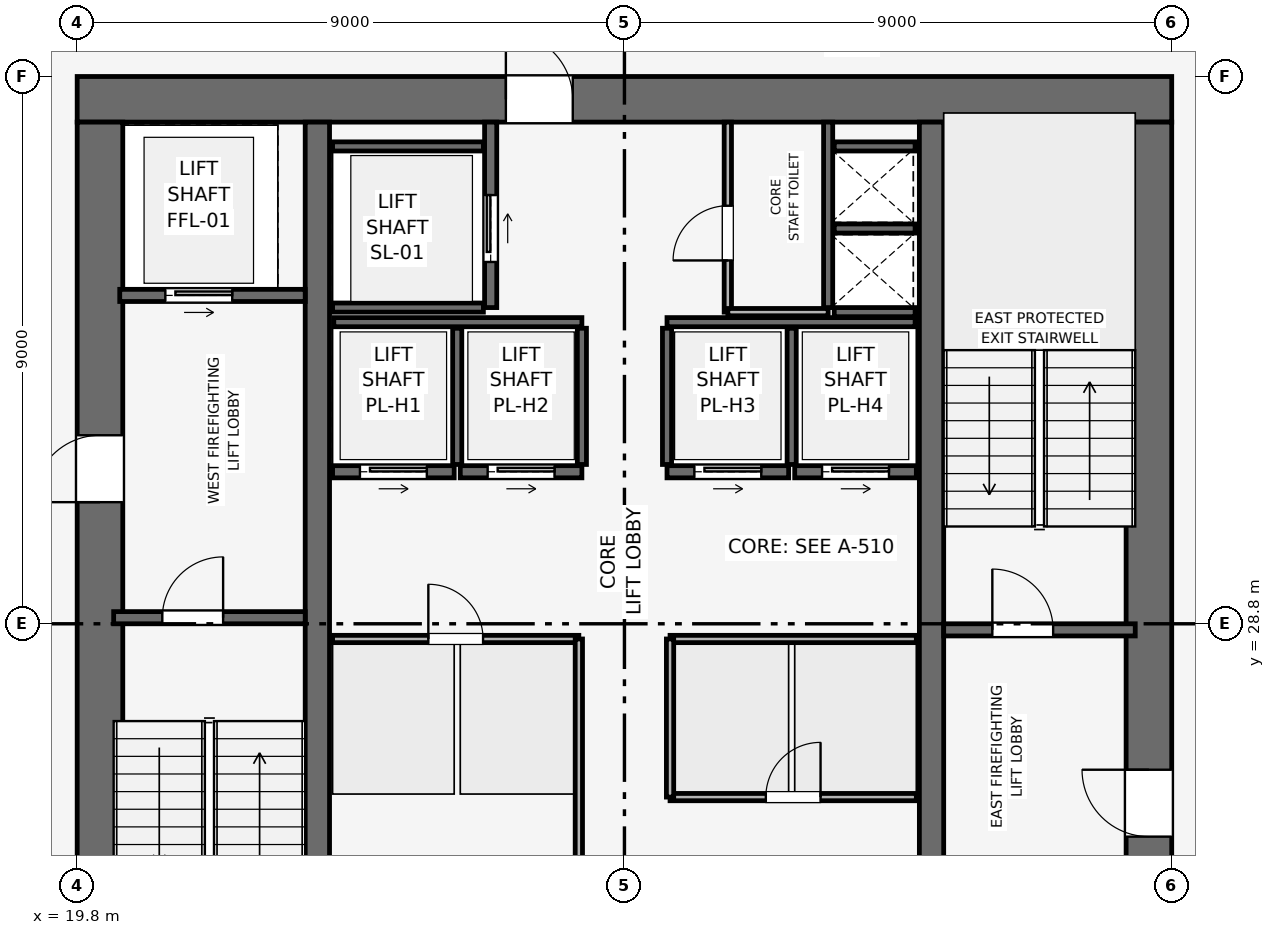
"""IFC4 building model, lengths in metres.
Left out: names, types, materials, properties, quantities, classifications, styles, units other than length and angle.
Written with IfcOpenShell. Run it as: python <this file> out.ifc"""

import sys

from ifc_helpers import new_model, si_unit, direction, frame, frame_2d, origin, place, context, subcontext, project, spatial, rectangle, extrude, element, fill, save


model = new_model("IFC4")
c1 = context("Model", 3, precision=1e-05, world=origin(), true_north=direction((0.0, 1.0)))
c2 = subcontext(c1, "Body", "Model", "MODEL_VIEW")
j1 = project(units=[si_unit("LENGTHUNIT", "METRE"), si_unit("PLANEANGLEUNIT", "RADIAN")], contexts=[c1])
p1 = place(None, origin())
s1 = spatial("IfcSite", under=j1, at=p1, CompositionType="ELEMENT")
p2 = place(p1, origin())
s2 = spatial("IfcBuilding", under=s1, at=p2, CompositionType="ELEMENT")
p3 = place(p2, frame((0.0, 0.0, 265.35)))
s3 = spatial("IfcBuildingStorey", under=s2, at=p3, CompositionType="ELEMENT", Elevation=265.35)
p4 = place(p3, frame((19.8, 37.425, 0.0), z_axis=(0.0, 0.0, 1.0), x_axis=(1.0, 0.0, 0.0)))
e1 = element("IfcWall", 1, at=p4, inside=s3, PredefinedType="SHEAR", context=c2, shape_type="SweptSolid", body=[
    extrude(rectangle(XDim=18.0, YDim=0.75, at=frame_2d((9.0, 0.0))), origin(), (0.0, 0.0, 1.0), 3.75),
])
p5 = place(p4, frame((7.05, 0.0, 0.0)))
e2 = element("IfcOpeningElement", 2, at=p5, cuts=e1, PredefinedType="OPENING", context=c2, shape_type="SweptSolid", body=[
    extrude(rectangle(XDim=1.1, YDim=2.15, at=frame_2d((0.55, 1.075))), frame((0.0, 0.385, 0.0), z_axis=(0.0, -1.0, 0.0), x_axis=(1.0, 0.0, 0.0)), (0.0, 0.0, 1.0), 0.77),
])
p6 = place(p3, frame((20.175, 20.55, 0.0), z_axis=(0.0, 0.0, 1.0), x_axis=(0.0, 1.0, 0.0)))
e3 = element("IfcWall", 3, at=p6, inside=s3, PredefinedType="SHEAR", context=c2, shape_type="SweptSolid", body=[
    extrude(rectangle(XDim=16.5, YDim=0.75, at=frame_2d((8.25, 0.0))), origin(), (0.0, 0.0, 1.0), 3.75),
])
p7 = place(p6, frame((10.25, 0.0, 0.0)))
e4 = element("IfcOpeningElement", 4, at=p7, cuts=e3, PredefinedType="OPENING", context=c2, shape_type="SweptSolid", body=[
    extrude(rectangle(XDim=1.1, YDim=2.15, at=frame_2d((0.55, 1.075))), frame((0.0, 0.385, 0.0), z_axis=(0.0, -1.0, 0.0), x_axis=(1.0, 0.0, 0.0)), (0.0, 0.0, 1.0), 0.77),
])
p8 = place(p3, frame((37.425, 20.55, 0.0), z_axis=(0.0, 0.0, 1.0), x_axis=(0.0, 1.0, 0.0)))
e5 = element("IfcWall", 5, at=p8, inside=s3, PredefinedType="SHEAR", context=c2, shape_type="SweptSolid", body=[
    extrude(rectangle(XDim=16.5, YDim=0.75, at=frame_2d((8.25, 0.0))), origin(), (0.0, 0.0, 1.0), 3.75),
])
p9 = place(p8, frame((4.75, 0.0, 0.0)))
e6 = element("IfcOpeningElement", 6, at=p9, cuts=e5, PredefinedType="OPENING", context=c2, shape_type="SweptSolid", body=[
    extrude(rectangle(XDim=1.1, YDim=2.15, at=frame_2d((0.55, 1.075))), frame((0.0, 0.385, 0.0), z_axis=(0.0, -1.0, 0.0), x_axis=(1.0, 0.0, 0.0)), (0.0, 0.0, 1.0), 0.77),
])
for number, where, z_axis, x_axis in (
    (7, (23.75, 20.55, 0.0), (0.0, 0.0, 1.0), (0.0, 1.0, 0.0)),
    (8, (33.85, 20.55, 0.0), (0.0, 0.0, 1.0), (0.0, 1.0, 0.0)),
):
    element("IfcWall", number, at=place(p3, frame(where, z_axis=z_axis, x_axis=x_axis)), inside=s3, PredefinedType="SHEAR", context=c2, shape_type="SweptSolid", body=[
        extrude(rectangle(XDim=16.5, YDim=0.4, at=frame_2d((8.25, 0.0))), origin(), (0.0, 0.0, 1.0), 3.75),
    ])
p10 = place(p3, frame((20.4, 28.9, 0.0), z_axis=(0.0, 0.0, 1.0), x_axis=(1.0, 0.0, 0.0)))
e9 = element("IfcWall", 9, at=p10, inside=s3, PredefinedType="SHEAR", context=c2, shape_type="SweptSolid", body=[
    extrude(rectangle(XDim=3.15, YDim=0.2, at=frame_2d((1.575, 0.0))), origin(), (0.0, 0.0, 1.0), 3.5),
])
p11 = place(p10, frame((0.8, 0.0, 0.0)))
e10 = element("IfcOpeningElement", 10, at=p11, cuts=e9, PredefinedType="OPENING", context=c2, shape_type="SweptSolid", body=[
    extrude(rectangle(XDim=1.0, YDim=2.1, at=frame_2d((0.5, 1.05))), frame((0.0, 0.11, 0.0), z_axis=(0.0, -1.0, 0.0), x_axis=(1.0, 0.0, 0.0)), (0.0, 0.0, 1.0), 0.22),
])
p12 = place(p3, frame((34.05, 28.7, 0.0), z_axis=(0.0, 0.0, 1.0), x_axis=(1.0, 0.0, 0.0)))
e11 = element("IfcWall", 11, at=p12, inside=s3, PredefinedType="SHEAR", context=c2, shape_type="SweptSolid", body=[
    extrude(rectangle(XDim=3.15, YDim=0.2, at=frame_2d((1.575, 0.0))), origin(), (0.0, 0.0, 1.0), 3.5),
])
p13 = place(p12, frame((0.8, 0.0, 0.0)))
e12 = element("IfcOpeningElement", 12, at=p13, cuts=e11, PredefinedType="OPENING", context=c2, shape_type="SweptSolid", body=[
    extrude(rectangle(XDim=1.0, YDim=2.1, at=frame_2d((0.5, 1.05))), frame((0.0, 0.11, 0.0), z_axis=(0.0, -1.0, 0.0), x_axis=(1.0, 0.0, 0.0)), (0.0, 0.0, 1.0), 0.22),
])
p14 = place(p3, frame((32.15, 34.0, 0.0), z_axis=(0.0, 0.0, 1.0), x_axis=(0.0, 1.0, 0.0)))
e13 = element("IfcWall", 13, at=p14, inside=s3, PredefinedType="SHEAR", context=c2, shape_type="SweptSolid", body=[
    extrude(rectangle(XDim=3.05, YDim=0.15, at=frame_2d((1.525, 0.0))), origin(), (0.0, 0.0, 1.0), 3.5),
])
for number, where, z_axis, x_axis in (
    (14, (32.25, 33.925, 0.0), (0.0, 0.0, 1.0), (1.0, 0.0, 0.0)),
    (15, (32.25, 35.3, 0.0), (0.0, 0.0, 1.0), (1.0, 0.0, 0.0)),
):
    element("IfcWall", number, at=place(p3, frame(where, z_axis=z_axis, x_axis=x_axis)), inside=s3, PredefinedType="SHEAR", context=c2, shape_type="SweptSolid", body=[
        extrude(rectangle(XDim=1.33, YDim=0.15, at=frame_2d((0.665, 0.0))), origin(), (0.0, 0.0, 1.0), 3.5),
    ])
p15 = place(p3, frame((20.5, 34.2, 0.0), z_axis=(0.0, 0.0, 1.0), x_axis=(1.0, 0.0, 0.0)))
e16 = element("IfcWall", 16, at=p15, inside=s3, PredefinedType="SHEAR", context=c2, shape_type="SweptSolid", body=[
    extrude(rectangle(XDim=3.05, YDim=0.2, at=frame_2d((1.525, 0.0))), origin(), (0.0, 0.0, 1.0), 3.5),
])
p16 = place(p15, frame((0.75, 0.0, 0.0)))
e17 = element("IfcOpeningElement", 17, at=p16, cuts=e16, PredefinedType="OPENING", context=c2, shape_type="SweptSolid", body=[
    extrude(rectangle(XDim=1.1, YDim=2.15, at=frame_2d((0.55, 1.075))), frame((0.0, 0.11, 0.0), z_axis=(0.0, -1.0, 0.0), x_axis=(1.0, 0.0, 0.0)), (0.0, 0.0, 1.0), 0.22),
])
p17 = place(p3, frame((26.6, 34.0, 0.0), z_axis=(0.0, 0.0, 1.0), x_axis=(0.0, 1.0, 0.0)))
e18 = element("IfcWall", 18, at=p17, inside=s3, PredefinedType="SHEAR", context=c2, shape_type="SweptSolid", body=[
    extrude(rectangle(XDim=3.05, YDim=0.2, at=frame_2d((1.525, 0.0))), origin(), (0.0, 0.0, 1.0), 3.5),
])
p18 = place(p17, frame((0.75, 0.0, 0.0)))
e19 = element("IfcOpeningElement", 19, at=p18, cuts=e18, PredefinedType="OPENING", context=c2, shape_type="SweptSolid", body=[
    extrude(rectangle(XDim=1.1, YDim=2.15, at=frame_2d((0.55, 1.075))), frame((0.0, 0.11, 0.0), z_axis=(0.0, -1.0, 0.0), x_axis=(1.0, 0.0, 0.0)), (0.0, 0.0, 1.0), 0.22),
])
for number, where, z_axis, x_axis in (
    (20, (24.0, 34.0, 0.0), (0.0, 0.0, 1.0), (1.0, 0.0, 0.0)),
    (21, (24.0, 36.65, 0.0), (0.0, 0.0, 1.0), (1.0, 0.0, 0.0)),
):
    element("IfcWall", number, at=place(p3, frame(where, z_axis=z_axis, x_axis=x_axis)), inside=s3, PredefinedType="SHEAR", context=c2, shape_type="SweptSolid", body=[
        extrude(rectangle(XDim=2.48, YDim=0.15, at=frame_2d((1.24, 0.0))), origin(), (0.0, 0.0, 1.0), 3.5),
    ])
p19 = place(p3, frame((24.0, 31.3, 0.0), z_axis=(0.0, 0.0, 1.0), x_axis=(1.0, 0.0, 0.0)))
e22 = element("IfcWall", 22, at=p19, inside=s3, PredefinedType="SHEAR", context=c2, shape_type="SweptSolid", body=[
    extrude(rectangle(XDim=2.0, YDim=0.2, at=frame_2d((1.0, 0.0))), origin(), (0.0, 0.0, 1.0), 3.5),
])
p20 = place(p19, frame((0.45, 0.0, 0.0)))
e23 = element("IfcOpeningElement", 23, at=p20, cuts=e22, PredefinedType="OPENING", context=c2, shape_type="SweptSolid", body=[
    extrude(rectangle(XDim=1.1, YDim=2.15, at=frame_2d((0.55, 1.075))), frame((0.0, 0.11, 0.0), z_axis=(0.0, -1.0, 0.0), x_axis=(1.0, 0.0, 0.0)), (0.0, 0.0, 1.0), 0.22),
])
p21 = place(p3, frame((26.1, 31.3, 0.0), z_axis=(0.0, 0.0, 1.0), x_axis=(1.0, 0.0, 0.0)))
e24 = element("IfcWall", 24, at=p21, inside=s3, PredefinedType="SHEAR", context=c2, shape_type="SweptSolid", body=[
    extrude(rectangle(XDim=2.0, YDim=0.2, at=frame_2d((1.0, 0.0))), origin(), (0.0, 0.0, 1.0), 3.5),
])
p22 = place(p21, frame((0.45, 0.0, 0.0)))
e25 = element("IfcOpeningElement", 25, at=p22, cuts=e24, PredefinedType="OPENING", context=c2, shape_type="SweptSolid", body=[
    extrude(rectangle(XDim=1.1, YDim=2.15, at=frame_2d((0.55, 1.075))), frame((0.0, 0.11, 0.0), z_axis=(0.0, -1.0, 0.0), x_axis=(1.0, 0.0, 0.0)), (0.0, 0.0, 1.0), 0.22),
])
p23 = place(p3, frame((29.5, 31.3, 0.0), z_axis=(0.0, 0.0, 1.0), x_axis=(1.0, 0.0, 0.0)))
e26 = element("IfcWall", 26, at=p23, inside=s3, PredefinedType="SHEAR", context=c2, shape_type="SweptSolid", body=[
    extrude(rectangle(XDim=2.0, YDim=0.2, at=frame_2d((1.0, 0.0))), origin(), (0.0, 0.0, 1.0), 3.5),
])
p24 = place(p23, frame((0.45, 0.0, 0.0)))
e27 = element("IfcOpeningElement", 27, at=p24, cuts=e26, PredefinedType="OPENING", context=c2, shape_type="SweptSolid", body=[
    extrude(rectangle(XDim=1.1, YDim=2.15, at=frame_2d((0.55, 1.075))), frame((0.0, 0.11, 0.0), z_axis=(0.0, -1.0, 0.0), x_axis=(1.0, 0.0, 0.0)), (0.0, 0.0, 1.0), 0.22),
])
p25 = place(p3, frame((31.6, 31.3, 0.0), z_axis=(0.0, 0.0, 1.0), x_axis=(1.0, 0.0, 0.0)))
e28 = element("IfcWall", 28, at=p25, inside=s3, PredefinedType="SHEAR", context=c2, shape_type="SweptSolid", body=[
    extrude(rectangle(XDim=2.0, YDim=0.2, at=frame_2d((1.0, 0.0))), origin(), (0.0, 0.0, 1.0), 3.5),
])
p26 = place(p25, frame((0.45, 0.0, 0.0)))
e29 = element("IfcOpeningElement", 29, at=p26, cuts=e28, PredefinedType="OPENING", context=c2, shape_type="SweptSolid", body=[
    extrude(rectangle(XDim=1.1, YDim=2.15, at=frame_2d((0.55, 1.075))), frame((0.0, 0.11, 0.0), z_axis=(0.0, -1.0, 0.0), x_axis=(1.0, 0.0, 0.0)), (0.0, 0.0, 1.0), 0.22),
])
p27 = place(p3, frame((32.25, 36.65, 0.0), z_axis=(0.0, 0.0, 1.0), x_axis=(1.0, 0.0, 0.0)))
e30 = element("IfcWall", 30, at=p27, inside=s3, PredefinedType="SHEAR", context=c2, shape_type="SweptSolid", body=[
    extrude(rectangle(XDim=1.33, YDim=0.15, at=frame_2d((0.665, 0.0))), origin(), (0.0, 0.0, 1.0), 3.5),
])
for number, where, z_axis, x_axis in (
    (31, (24.02, 33.76, 0.0), (0.0, 0.0, 1.0), (1.0, 0.0, 0.0)),
    (32, (29.5, 33.76, 0.0), (0.0, 0.0, 1.0), (1.0, 0.0, 0.0)),
):
    element("IfcWall", number, at=place(p3, frame(where, z_axis=z_axis, x_axis=x_axis)), inside=s3, PredefinedType="SHEAR", context=c2, shape_type="SweptSolid", body=[
        extrude(rectangle(XDim=4.08, YDim=0.15, at=frame_2d((2.04, 0.0))), origin(), (0.0, 0.0, 1.0), 3.5),
    ])
for number, where, z_axis, x_axis in (
    (33, (26.05, 31.42, 0.0), (0.0, 0.0, 1.0), (0.0, 1.0, 0.0)),
    (34, (28.1, 31.42, 0.0), (0.0, 0.0, 1.0), (0.0, 1.0, 0.0)),
    (35, (29.5, 31.42, 0.0), (0.0, 0.0, 1.0), (0.0, 1.0, 0.0)),
    (36, (31.55, 31.42, 0.0), (0.0, 0.0, 1.0), (0.0, 1.0, 0.0)),
):
    element("IfcWall", number, at=place(p3, frame(where, z_axis=z_axis, x_axis=x_axis)), inside=s3, PredefinedType="SHEAR", context=c2, shape_type="SweptSolid", body=[
        extrude(rectangle(XDim=2.24, YDim=0.15, at=frame_2d((1.12, 0.0))), origin(), (0.0, 0.0, 1.0), 3.5),
    ])
p28 = place(p3, frame((30.5, 33.925, 0.0), z_axis=(0.0, 0.0, 1.0), x_axis=(0.0, 1.0, 0.0)))
e37 = element("IfcWall", 37, at=p28, inside=s3, PredefinedType="PARTITIONING", context=c2, shape_type="SweptSolid", body=[
    extrude(rectangle(XDim=3.125, YDim=0.12, at=frame_2d((1.562, 0.0))), origin(), (0.0, 0.0, 1.0), 3.5),
])
p29 = place(p28, frame((0.85, 0.0, 0.0)))
e38 = element("IfcOpeningElement", 38, at=p29, cuts=e37, PredefinedType="OPENING", context=c2, shape_type="SweptSolid", body=[
    extrude(rectangle(XDim=0.9, YDim=2.1, at=frame_2d((0.45, 1.05))), frame((0.0, 0.07, 0.0), z_axis=(0.0, -1.0, 0.0), x_axis=(1.0, 0.0, 0.0)), (0.0, 0.0, 1.0), 0.14),
])
p30 = place(p3, frame((30.5, 33.925, 0.0), z_axis=(0.0, 0.0, 1.0), x_axis=(1.0, 0.0, 0.0)))
e39 = element("IfcWall", 39, at=p30, inside=s3, PredefinedType="PARTITIONING", context=c2, shape_type="SweptSolid", body=[
    extrude(rectangle(XDim=1.65, YDim=0.12, at=frame_2d((0.825, 0.0))), origin(), (0.0, 0.0, 1.0), 3.5),
])
p31 = place(p3, frame((24.0, 28.55, 0.0), z_axis=(0.0, 0.0, 1.0), x_axis=(1.0, 0.0, 0.0)))
e40 = element("IfcWall", 40, at=p31, inside=s3, PredefinedType="PARTITIONING", context=c2, shape_type="SweptSolid", body=[
    extrude(rectangle(XDim=4.05, YDim=0.12, at=frame_2d((2.025, 0.0))), origin(), (0.0, 0.0, 1.0), 3.5),
])
p32 = place(p31, frame((1.575, 0.0, 0.0)))
e41 = element("IfcOpeningElement", 41, at=p32, cuts=e40, PredefinedType="OPENING", context=c2, shape_type="SweptSolid", body=[
    extrude(rectangle(XDim=0.9, YDim=2.1, at=frame_2d((0.45, 1.05))), frame((0.0, 0.07, 0.0), z_axis=(0.0, -1.0, 0.0), x_axis=(1.0, 0.0, 0.0)), (0.0, 0.0, 1.0), 0.14),
])
p33 = place(p3, frame((28.05, 20.4, 0.0), z_axis=(0.0, 0.0, 1.0), x_axis=(0.0, 1.0, 0.0)))
e42 = element("IfcWall", 42, at=p33, inside=s3, PredefinedType="PARTITIONING", context=c2, shape_type="SweptSolid", body=[
    extrude(rectangle(XDim=8.15, YDim=0.12, at=frame_2d((4.075, 0.0))), origin(), (0.0, 0.0, 1.0), 3.5),
])
p34 = place(p3, frame((29.55, 25.95, 0.0), z_axis=(0.0, 0.0, 1.0), x_axis=(1.0, 0.0, 0.0)))
e43 = element("IfcWall", 43, at=p34, inside=s3, PredefinedType="PARTITIONING", context=c2, shape_type="SweptSolid", body=[
    extrude(rectangle(XDim=4.05, YDim=0.12, at=frame_2d((2.025, 0.0))), origin(), (0.0, 0.0, 1.0), 3.5),
])
p35 = place(p34, frame((1.575, 0.0, 0.0)))
e44 = element("IfcOpeningElement", 44, at=p35, cuts=e43, PredefinedType="OPENING", context=c2, shape_type="SweptSolid", body=[
    extrude(rectangle(XDim=0.9, YDim=2.1, at=frame_2d((0.45, 1.05))), frame((0.0, 0.07, 0.0), z_axis=(0.0, -1.0, 0.0), x_axis=(1.0, 0.0, 0.0)), (0.0, 0.0, 1.0), 0.14),
])
p36 = place(p3, frame((29.55, 28.55, 0.0), z_axis=(0.0, 0.0, 1.0), x_axis=(1.0, 0.0, 0.0)))
e45 = element("IfcWall", 45, at=p36, inside=s3, PredefinedType="PARTITIONING", context=c2, shape_type="SweptSolid", body=[
    extrude(rectangle(XDim=4.05, YDim=0.12, at=frame_2d((2.025, 0.0))), origin(), (0.0, 0.0, 1.0), 3.5),
])
p37 = place(p3, frame((29.55, 25.95, 0.0), z_axis=(0.0, 0.0, 1.0), x_axis=(0.0, 1.0, 0.0)))
e46 = element("IfcWall", 46, at=p37, inside=s3, PredefinedType="PARTITIONING", context=c2, shape_type="SweptSolid", body=[
    extrude(rectangle(XDim=2.6, YDim=0.12, at=frame_2d((1.3, 0.0))), origin(), (0.0, 0.0, 1.0), 3.5),
])
p38 = place(p11, origin())
e47 = element("IfcDoor", 47, at=p38, inside=s3, OperationType="SINGLE_SWING_RIGHT", PredefinedType="DOOR", context=c2, shape_type="SweptSolid", body=[
    extrude(rectangle(XDim=1.0, YDim=2.1, at=frame_2d((0.5, 1.05))), frame((0.0, 0.025, 0.0), z_axis=(0.0, -1.0, 0.0), x_axis=(1.0, 0.0, 0.0)), (0.0, 0.0, 1.0), 0.05),
])
fill(e10, e47)
p39 = place(p13, origin())
e48 = element("IfcDoor", 48, at=p39, inside=s3, OperationType="SINGLE_SWING_LEFT", PredefinedType="DOOR", context=c2, shape_type="SweptSolid", body=[
    extrude(rectangle(XDim=1.0, YDim=2.1, at=frame_2d((0.5, 1.05))), frame((0.0, 0.025, 0.0), z_axis=(0.0, -1.0, 0.0), x_axis=(1.0, 0.0, 0.0)), (0.0, 0.0, 1.0), 0.05),
])
fill(e12, e48)
p40 = place(p16, origin())
e49 = element("IfcDoor", 49, at=p40, inside=s3, OperationType="SLIDING_TO_RIGHT", PredefinedType="DOOR", context=c2, shape_type="SweptSolid", body=[
    extrude(rectangle(XDim=1.1, YDim=2.15, at=frame_2d((0.55, 1.075))), frame((0.0, 0.025, 0.0), z_axis=(0.0, -1.0, 0.0), x_axis=(1.0, 0.0, 0.0)), (0.0, 0.0, 1.0), 0.05),
])
fill(e17, e49)
p41 = place(p18, origin())
e50 = element("IfcDoor", 50, at=p41, inside=s3, OperationType="SLIDING_TO_RIGHT", PredefinedType="DOOR", context=c2, shape_type="SweptSolid", body=[
    extrude(rectangle(XDim=1.1, YDim=2.15, at=frame_2d((0.55, 1.075))), frame((0.0, 0.025, 0.0), z_axis=(0.0, -1.0, 0.0), x_axis=(1.0, 0.0, 0.0)), (0.0, 0.0, 1.0), 0.05),
])
fill(e19, e50)
p42 = place(p20, origin())
e51 = element("IfcDoor", 51, at=p42, inside=s3, OperationType="SLIDING_TO_RIGHT", PredefinedType="DOOR", context=c2, shape_type="SweptSolid", body=[
    extrude(rectangle(XDim=1.1, YDim=2.15, at=frame_2d((0.55, 1.075))), frame((0.0, 0.025, 0.0), z_axis=(0.0, -1.0, 0.0), x_axis=(1.0, 0.0, 0.0)), (0.0, 0.0, 1.0), 0.05),
])
fill(e23, e51)
p43 = place(p22, origin())
e52 = element("IfcDoor", 52, at=p43, inside=s3, OperationType="SLIDING_TO_RIGHT", PredefinedType="DOOR", context=c2, shape_type="SweptSolid", body=[
    extrude(rectangle(XDim=1.1, YDim=2.15, at=frame_2d((0.55, 1.075))), frame((0.0, 0.025, 0.0), z_axis=(0.0, -1.0, 0.0), x_axis=(1.0, 0.0, 0.0)), (0.0, 0.0, 1.0), 0.05),
])
fill(e25, e52)
p44 = place(p24, origin())
e53 = element("IfcDoor", 53, at=p44, inside=s3, OperationType="SLIDING_TO_RIGHT", PredefinedType="DOOR", context=c2, shape_type="SweptSolid", body=[
    extrude(rectangle(XDim=1.1, YDim=2.15, at=frame_2d((0.55, 1.075))), frame((0.0, 0.025, 0.0), z_axis=(0.0, -1.0, 0.0), x_axis=(1.0, 0.0, 0.0)), (0.0, 0.0, 1.0), 0.05),
])
fill(e27, e53)
p45 = place(p26, origin())
e54 = element("IfcDoor", 54, at=p45, inside=s3, OperationType="SLIDING_TO_RIGHT", PredefinedType="DOOR", context=c2, shape_type="SweptSolid", body=[
    extrude(rectangle(XDim=1.1, YDim=2.15, at=frame_2d((0.55, 1.075))), frame((0.0, 0.025, 0.0), z_axis=(0.0, -1.0, 0.0), x_axis=(1.0, 0.0, 0.0)), (0.0, 0.0, 1.0), 0.05),
])
fill(e29, e54)
p46 = place(p29, origin())
e55 = element("IfcDoor", 55, at=p46, inside=s3, OperationType="SINGLE_SWING_LEFT", PredefinedType="DOOR", context=c2, shape_type="SweptSolid", body=[
    extrude(rectangle(XDim=0.9, YDim=2.1, at=frame_2d((0.45, 1.05))), frame((0.0, 0.025, 0.0), z_axis=(0.0, -1.0, 0.0), x_axis=(1.0, 0.0, 0.0)), (0.0, 0.0, 1.0), 0.05),
])
fill(e38, e55)
p47 = place(p32, origin())
e56 = element("IfcDoor", 56, at=p47, inside=s3, OperationType="SINGLE_SWING_LEFT", PredefinedType="DOOR", context=c2, shape_type="SweptSolid", body=[
    extrude(rectangle(XDim=0.9, YDim=2.1, at=frame_2d((0.45, 1.05))), frame((0.0, 0.025, 0.0), z_axis=(0.0, -1.0, 0.0), x_axis=(1.0, 0.0, 0.0)), (0.0, 0.0, 1.0), 0.05),
])
fill(e41, e56)
p48 = place(p35, origin())
e57 = element("IfcDoor", 57, at=p48, inside=s3, OperationType="SINGLE_SWING_RIGHT", PredefinedType="DOOR", context=c2, shape_type="SweptSolid", body=[
    extrude(rectangle(XDim=0.9, YDim=2.1, at=frame_2d((0.45, 1.05))), frame((0.0, 0.025, 0.0), z_axis=(0.0, -1.0, 0.0), x_axis=(1.0, 0.0, 0.0)), (0.0, 0.0, 1.0), 0.05),
])
fill(e44, e57)
p49 = place(p7, origin())
e58 = element("IfcDoor", 58, at=p49, inside=s3, OperationType="SINGLE_SWING_LEFT", PredefinedType="DOOR", context=c2, shape_type="SweptSolid", body=[
    extrude(rectangle(XDim=1.1, YDim=2.15, at=frame_2d((0.55, 1.075))), frame((0.0, 0.025, 0.0), z_axis=(0.0, -1.0, 0.0), x_axis=(1.0, 0.0, 0.0)), (0.0, 0.0, 1.0), 0.05),
])
fill(e4, e58)
p50 = place(p9, origin())
e59 = element("IfcDoor", 59, at=p50, inside=s3, OperationType="SINGLE_SWING_RIGHT", PredefinedType="DOOR", context=c2, shape_type="SweptSolid", body=[
    extrude(rectangle(XDim=1.1, YDim=2.15, at=frame_2d((0.55, 1.075))), frame((0.0, 0.025, 0.0), z_axis=(0.0, -1.0, 0.0), x_axis=(1.0, 0.0, 0.0)), (0.0, 0.0, 1.0), 0.05),
])
fill(e6, e59)
p51 = place(p5, origin())
e60 = element("IfcDoor", 60, at=p51, inside=s3, OperationType="SINGLE_SWING_LEFT", PredefinedType="DOOR", context=c2, shape_type="SweptSolid", body=[
    extrude(rectangle(XDim=1.1, YDim=2.15, at=frame_2d((0.55, 1.075))), frame((0.0, 0.025, 0.0), z_axis=(0.0, -1.0, 0.0), x_axis=(1.0, 0.0, 0.0)), (0.0, 0.0, 1.0), 0.05),
])
fill(e2, e60)
save(model, sys.argv[1])
